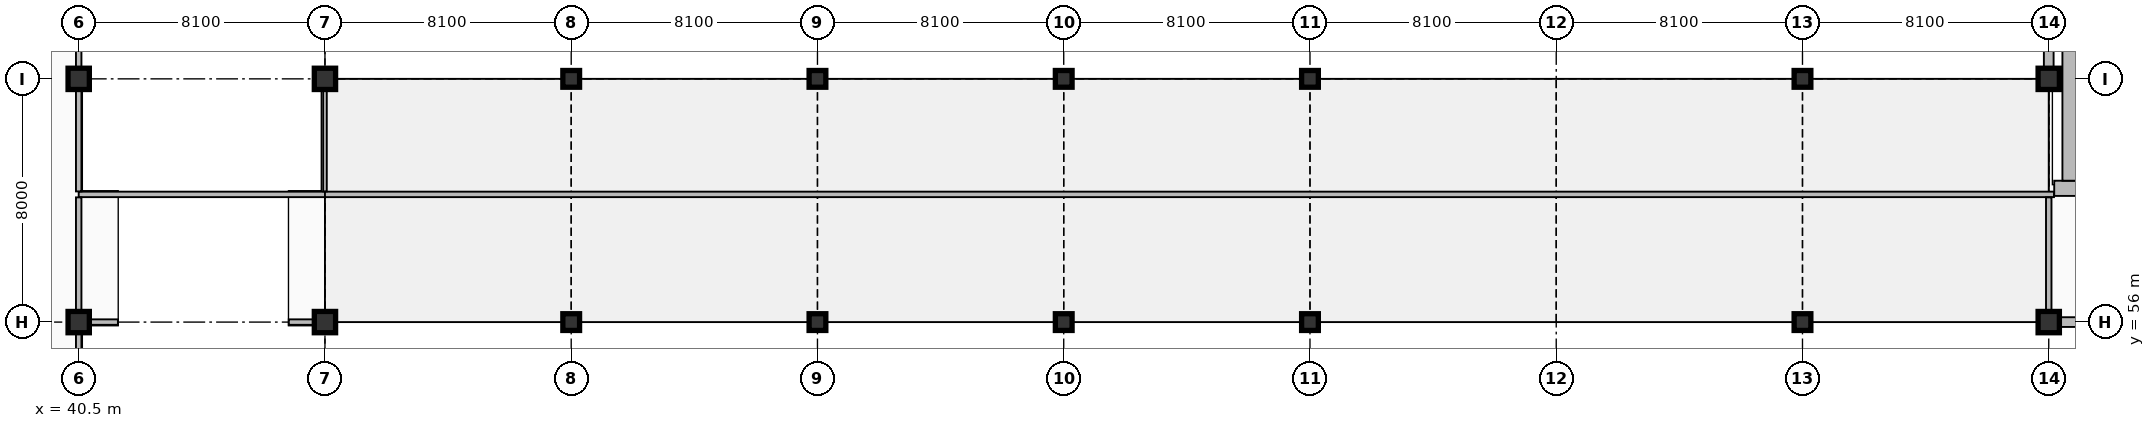
"""IFC4 building model, lengths in metres.
Left out: names, types, materials, properties, quantities, classifications, styles, units other than length and angle.
Written with IfcOpenShell. Run it as: python <this file> out.ifc"""

import sys

from ifc_helpers import new_model, si_unit, direction, frame, frame_2d, origin, origin_2d, place, context, subcontext, project, spatial, rectangle, extrude, element, fill, save


model = new_model("IFC4")
c1 = context("Model", 3, precision=1e-05, world=origin(), true_north=direction((0.0, 1.0)))
c2 = subcontext(c1, "Body", "Model", "MODEL_VIEW")
j1 = project(units=[si_unit("LENGTHUNIT", "METRE"), si_unit("PLANEANGLEUNIT", "RADIAN")], contexts=[c1])
p1 = place(None, origin())
s1 = spatial("IfcSite", under=j1, at=p1, CompositionType="ELEMENT")
p2 = place(p1, origin())
s2 = spatial("IfcBuilding", under=s1, at=p2, CompositionType="ELEMENT")
p3 = place(p2, frame((0.0, 0.0, 10.2)))
s3 = spatial("IfcBuildingStorey", under=s2, at=p3, CompositionType="ELEMENT", Elevation=10.2)
p4 = place(p3, frame((105.48, 60.4, 0.0), z_axis=(0.0, 0.0, 1.0), x_axis=(1.0, 0.0, 0.0)))
e1 = element("IfcWall", 1, at=p4, inside=s3, PredefinedType="SHEAR", context=c2, shape_type="SweptSolid", body=[
    extrude(rectangle(XDim=12.97, YDim=0.5, at=frame_2d((6.485, 0.0))), origin(), (0.0, 0.0, 1.0), 4.5),
])
p5 = place(p4, frame((1.27, 0.0, 0.0)))
e2 = element("IfcOpeningElement", 2, at=p5, cuts=e1, PredefinedType="OPENING", context=c2, shape_type="SweptSolid", body=[
    extrude(rectangle(XDim=1.15, YDim=2.25, at=frame_2d((0.575, 1.125))), frame((0.0, 0.26, 0.0), z_axis=(0.0, -1.0, 0.0), x_axis=(1.0, 0.0, 0.0)), (0.0, 0.0, 1.0), 0.52),
])
p6 = place(p4, frame((10.475, 0.0, 0.0)))
e3 = element("IfcOpeningElement", 3, at=p6, cuts=e1, PredefinedType="OPENING", context=c2, shape_type="SweptSolid", body=[
    extrude(rectangle(XDim=1.3, YDim=2.3, at=frame_2d((0.65, 1.15))), frame((0.0, 0.26, 0.0), z_axis=(0.0, -1.0, 0.0), x_axis=(1.0, 0.0, 0.0)), (0.0, 0.0, 1.0), 0.52),
])
p7 = place(p3, frame((106.0, 60.65, 0.0), z_axis=(0.0, 0.0, 1.0), x_axis=(0.0, 1.0, 0.0)))
e4 = element("IfcWall", 4, at=p7, inside=s3, PredefinedType="SHEAR", context=c2, shape_type="SweptSolid", body=[
    extrude(rectangle(XDim=7.9, YDim=0.5, at=frame_2d((3.95, 0.0))), origin(), (0.0, 0.0, 1.0), 4.5),
])
for number, where, z_axis, x_axis in (
    (5, (40.5, 56.0, 0.0), (0.0, 0.0, 1.0), (1.0, 0.0, 0.0)),
    (6, (40.5, 64.0, 0.0), (0.0, 0.0, 1.0), (1.0, 0.0, 0.0)),
    (7, (48.6, 56.0, 0.0), (0.0, 0.0, 1.0), (1.0, 0.0, 0.0)),
    (8, (48.6, 64.0, 0.0), (0.0, 0.0, 1.0), (1.0, 0.0, 0.0)),
):
    element("IfcColumn", number, at=place(p3, frame(where, z_axis=z_axis, x_axis=x_axis)), inside=s3, PredefinedType="COLUMN", context=c2, shape_type="SweptSolid", body=[
        extrude(rectangle(XDim=0.7, YDim=0.7, at=origin_2d()), origin(), (0.0, 0.0, 1.0), 4.5),
    ])
for number, where, z_axis, x_axis in (
    (9, (56.7, 56.0, 0.0), (0.0, 0.0, 1.0), (1.0, 0.0, 0.0)),
    (10, (56.7, 64.0, 0.0), (0.0, 0.0, 1.0), (1.0, 0.0, 0.0)),
    (11, (64.8, 56.0, 0.0), (0.0, 0.0, 1.0), (1.0, 0.0, 0.0)),
    (12, (64.8, 64.0, 0.0), (0.0, 0.0, 1.0), (1.0, 0.0, 0.0)),
    (13, (72.9, 56.0, 0.0), (0.0, 0.0, 1.0), (1.0, 0.0, 0.0)),
    (14, (72.9, 64.0, 0.0), (0.0, 0.0, 1.0), (1.0, 0.0, 0.0)),
    (15, (81.0, 56.0, 0.0), (0.0, 0.0, 1.0), (1.0, 0.0, 0.0)),
    (16, (81.0, 64.0, 0.0), (0.0, 0.0, 1.0), (1.0, 0.0, 0.0)),
    (17, (97.2, 56.0, 0.0), (0.0, 0.0, 1.0), (1.0, 0.0, 0.0)),
    (18, (97.2, 64.0, 0.0), (0.0, 0.0, 1.0), (1.0, 0.0, 0.0)),
):
    element("IfcColumn", number, at=place(p3, frame(where, z_axis=z_axis, x_axis=x_axis)), inside=s3, PredefinedType="COLUMN", context=c2, shape_type="SweptSolid", body=[
        extrude(rectangle(XDim=0.55, YDim=0.55, at=origin_2d()), origin(), (0.0, 0.0, 1.0), 4.24),
    ])
for number, where, z_axis, x_axis in (
    (19, (105.3, 56.0, 0.0), (0.0, 0.0, 1.0), (1.0, 0.0, 0.0)),
    (20, (105.3, 64.0, 0.0), (0.0, 0.0, 1.0), (1.0, 0.0, 0.0)),
):
    element("IfcColumn", number, at=place(p3, frame(where, z_axis=z_axis, x_axis=x_axis)), inside=s3, PredefinedType="COLUMN", context=c2, shape_type="SweptSolid", body=[
        extrude(rectangle(XDim=0.7, YDim=0.7, at=origin_2d()), origin(), (0.0, 0.0, 1.0), 4.5),
    ])
p8 = place(p3, frame((105.48, 56.0, 0.0), z_axis=(0.0, 0.0, 1.0), x_axis=(1.0, 0.0, 0.0)))
e21 = element("IfcWall", 21, at=p8, inside=s3, PredefinedType="SOLIDWALL", context=c2, shape_type="SweptSolid", body=[
    extrude(rectangle(XDim=12.06, YDim=0.32, at=frame_2d((6.03, 0.0))), origin(), (0.0, 0.0, 1.0), 3.544),
])
p9 = place(p8, frame((2.25, 0.0, 0.95)))
e22 = element("IfcOpeningElement", 22, at=p9, cuts=e21, PredefinedType="OPENING", context=c2, shape_type="SweptSolid", body=[
    extrude(rectangle(XDim=3.6, YDim=1.8, at=frame_2d((1.8, 0.9))), frame((0.0, 0.17, 0.0), z_axis=(0.0, -1.0, 0.0), x_axis=(1.0, 0.0, 0.0)), (0.0, 0.0, 1.0), 0.34),
])
p10 = place(p3, frame((105.3, 80.0, 0.0), z_axis=(0.0, 0.0, 1.0), x_axis=(0.0, -1.0, 0.0)))
e23 = element("IfcWall", 23, at=p10, inside=s3, PredefinedType="SOLIDWALL", context=c2, shape_type="SweptSolid", body=[
    extrude(rectangle(XDim=15.82, YDim=0.32, at=frame_2d((7.91, 0.0))), origin(), (0.0, 0.0, 1.0), 3.732),
])
p11 = place(p10, frame((4.05, 0.0, 0.95)))
e24 = element("IfcOpeningElement", 24, at=p11, cuts=e23, PredefinedType="OPENING", context=c2, shape_type="SweptSolid", body=[
    extrude(rectangle(XDim=2.7, YDim=1.8, at=frame_2d((1.35, 0.9))), frame((0.0, 0.17, 0.0), z_axis=(0.0, -1.0, 0.0), x_axis=(1.0, 0.0, 0.0)), (0.0, 0.0, 1.0), 0.34),
])
p12 = place(p3, frame((40.858, 56.0, 0.0), z_axis=(0.0, 0.0, 1.0), x_axis=(1.0, 0.0, 0.0)))
e25 = element("IfcWall", 25, at=p12, inside=s3, PredefinedType="PARTITIONING", context=c2, shape_type="SweptSolid", body=[
    extrude(rectangle(XDim=0.932, YDim=0.18, at=frame_2d((0.466, 0.0))), origin(), (0.0, 0.0, 1.0), 4.24),
])
p13 = place(p3, frame((47.41, 56.0, 0.0), z_axis=(0.0, 0.0, 1.0), x_axis=(1.0, 0.0, 0.0)))
e26 = element("IfcWall", 26, at=p13, inside=s3, PredefinedType="PARTITIONING", context=c2, shape_type="SweptSolid", body=[
    extrude(rectangle(XDim=0.832, YDim=0.18, at=frame_2d((0.416, 0.0))), origin(), (0.0, 0.0, 1.0), 4.24),
])
p14 = place(p3, frame((40.5, 60.2, 0.0), z_axis=(0.0, 0.0, 1.0), x_axis=(1.0, 0.0, 0.0)))
e27 = element("IfcWall", 27, at=p14, inside=s3, PredefinedType="PARTITIONING", context=c2, shape_type="SweptSolid", body=[
    extrude(rectangle(XDim=8.1, YDim=0.18, at=frame_2d((4.05, 0.0))), origin(), (0.0, 0.0, 1.0), 4.24),
])
p15 = place(p3, frame((48.6, 60.2, 0.0), z_axis=(0.0, 0.0, 1.0), x_axis=(1.0, 0.0, 0.0)))
e28 = element("IfcWall", 28, at=p15, inside=s3, PredefinedType="PARTITIONING", context=c2, shape_type="SweptSolid", body=[
    extrude(rectangle(XDim=56.872, YDim=0.18, at=frame_2d((28.436, 0.0))), origin(), (0.0, 0.0, 1.0), 4.24),
])
p16 = place(p15, frame((27.886, 0.0, 0.0)))
e29 = element("IfcOpeningElement", 29, at=p16, cuts=e28, PredefinedType="OPENING", context=c2, shape_type="SweptSolid", body=[
    extrude(rectangle(XDim=1.1, YDim=2.2, at=frame_2d((0.55, 1.1))), frame((0.0, 0.1, 0.0), z_axis=(0.0, -1.0, 0.0), x_axis=(1.0, 0.0, 0.0)), (0.0, 0.0, 1.0), 0.2),
])
p17 = place(p3, frame((40.5, 50.108, 0.0), z_axis=(0.0, 0.0, 1.0), x_axis=(0.0, 1.0, 0.0)))
e30 = element("IfcWall", 30, at=p17, inside=s3, PredefinedType="PARTITIONING", context=c2, shape_type="SweptSolid", body=[
    extrude(rectangle(XDim=5.534, YDim=0.18, at=frame_2d((2.767, 0.0))), origin(), (0.0, 0.0, 1.0), 3.769),
])
p18 = place(p3, frame((40.5, 56.358, 0.0), z_axis=(0.0, 0.0, 1.0), x_axis=(0.0, 1.0, 0.0)))
e31 = element("IfcWall", 31, at=p18, inside=s3, PredefinedType="PARTITIONING", context=c2, shape_type="SweptSolid", body=[
    extrude(rectangle(XDim=3.744, YDim=0.18, at=frame_2d((1.872, 0.0))), origin(), (0.0, 0.0, 1.0), 3.769),
])
p19 = place(p18, frame((1.372, 0.0, 0.0)))
e32 = element("IfcOpeningElement", 32, at=p19, cuts=e31, PredefinedType="OPENING", context=c2, shape_type="SweptSolid", body=[
    extrude(rectangle(XDim=1.6, YDim=2.35, at=frame_2d((0.8, 1.175))), frame((0.0, 0.1, 0.0), z_axis=(0.0, -1.0, 0.0), x_axis=(1.0, 0.0, 0.0)), (0.0, 0.0, 1.0), 0.2),
])
p20 = place(p3, frame((40.5, 60.298, 0.0), z_axis=(0.0, 0.0, 1.0), x_axis=(0.0, 1.0, 0.0)))
e33 = element("IfcWall", 33, at=p20, inside=s3, PredefinedType="PARTITIONING", context=c2, shape_type="SweptSolid", body=[
    extrude(rectangle(XDim=3.344, YDim=0.18, at=frame_2d((1.672, 0.0))), origin(), (0.0, 0.0, 1.0), 3.769),
])
p21 = place(p3, frame((40.5, 64.358, 0.0), z_axis=(0.0, 0.0, 1.0), x_axis=(0.0, 1.0, 0.0)))
e34 = element("IfcWall", 34, at=p21, inside=s3, PredefinedType="PARTITIONING", context=c2, shape_type="SweptSolid", body=[
    extrude(rectangle(XDim=7.284, YDim=0.18, at=frame_2d((3.642, 0.0))), origin(), (0.0, 0.0, 1.0), 3.732),
])
p22 = place(p3, frame((48.6, 60.298, 0.0), z_axis=(0.0, 0.0, 1.0), x_axis=(0.0, 1.0, 0.0)))
e35 = element("IfcWall", 35, at=p22, inside=s3, PredefinedType="PARTITIONING", context=c2, shape_type="SweptSolid", body=[
    extrude(rectangle(XDim=3.344, YDim=0.12, at=frame_2d((1.672, 0.0))), origin(), (0.0, 0.0, 1.0), 3.732),
])
p23 = place(p3, frame((105.3, 56.358, 0.0), z_axis=(0.0, 0.0, 1.0), x_axis=(0.0, 1.0, 0.0)))
e36 = element("IfcWall", 36, at=p23, inside=s3, PredefinedType="PARTITIONING", context=c2, shape_type="SweptSolid", body=[
    extrude(rectangle(XDim=3.744, YDim=0.18, at=frame_2d((1.872, 0.0))), origin(), (0.0, 0.0, 1.0), 3.769),
])
p24 = place(p23, frame((1.372, 0.0, 0.0)))
e37 = element("IfcOpeningElement", 37, at=p24, cuts=e36, PredefinedType="OPENING", context=c2, shape_type="SweptSolid", body=[
    extrude(rectangle(XDim=1.6, YDim=2.35, at=frame_2d((0.8, 1.175))), frame((0.0, 0.1, 0.0), z_axis=(0.0, -1.0, 0.0), x_axis=(1.0, 0.0, 0.0)), (0.0, 0.0, 1.0), 0.2),
])
p25 = place(p16, origin())
e38 = element("IfcDoor", 38, at=p25, inside=s3, OperationType="SINGLE_SWING_RIGHT", PredefinedType="DOOR", context=c2, shape_type="SweptSolid", body=[
    extrude(rectangle(XDim=1.1, YDim=2.2, at=frame_2d((0.55, 1.1))), frame((0.0, 0.025, 0.0), z_axis=(0.0, -1.0, 0.0), x_axis=(1.0, 0.0, 0.0)), (0.0, 0.0, 1.0), 0.05),
])
fill(e29, e38)
p26 = place(p19, frame((1.6, 0.0, 0.0), z_axis=(0.0, 0.0, 1.0), x_axis=(-1.0, 0.0, 0.0)))
e39 = element("IfcDoor", 39, at=p26, inside=s3, OperationType="DOUBLE_DOOR_SINGLE_SWING", PredefinedType="DOOR", context=c2, shape_type="SweptSolid", body=[
    extrude(rectangle(XDim=1.6, YDim=2.35, at=frame_2d((0.8, 1.175))), frame((0.0, 0.025, 0.0), z_axis=(0.0, -1.0, 0.0), x_axis=(1.0, 0.0, 0.0)), (0.0, 0.0, 1.0), 0.05),
])
fill(e32, e39)
p27 = place(p24, origin())
e40 = element("IfcDoor", 40, at=p27, inside=s3, OperationType="DOUBLE_DOOR_SINGLE_SWING", PredefinedType="DOOR", context=c2, shape_type="SweptSolid", body=[
    extrude(rectangle(XDim=1.6, YDim=2.35, at=frame_2d((0.8, 1.175))), frame((0.0, 0.025, 0.0), z_axis=(0.0, -1.0, 0.0), x_axis=(1.0, 0.0, 0.0)), (0.0, 0.0, 1.0), 0.05),
])
fill(e37, e40)
save(model, sys.argv[1])
